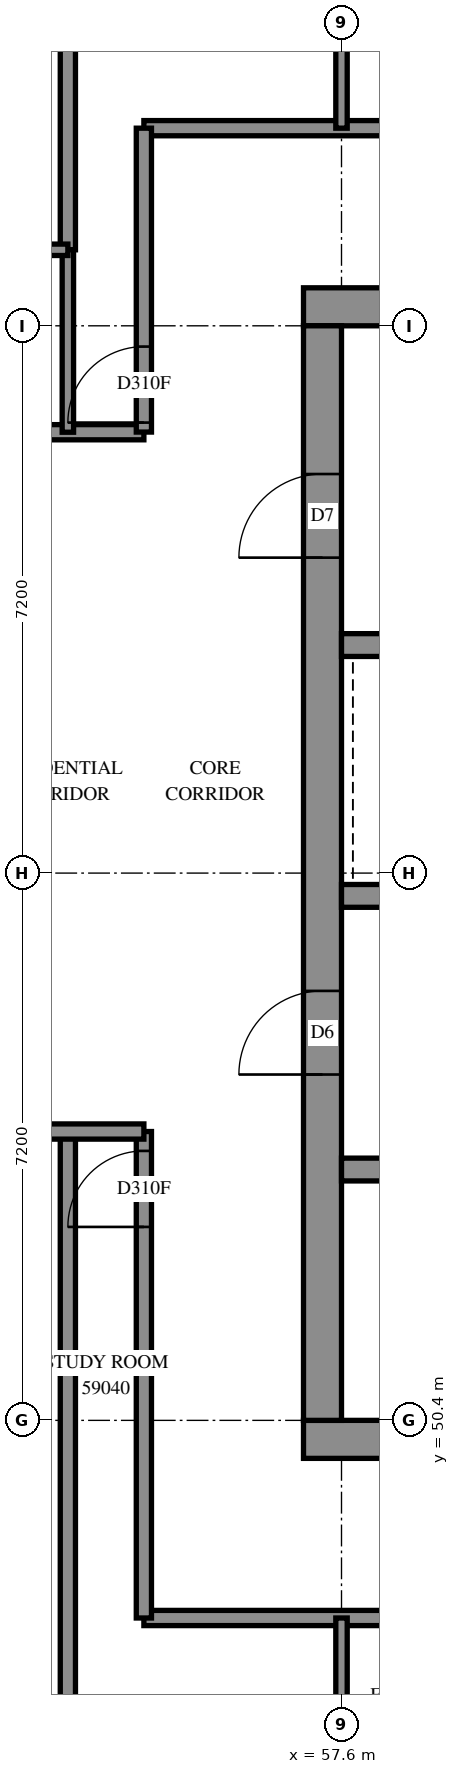
"""IFC4 building model, lengths in metres.
Left out: names, types, materials, properties, quantities, classifications, styles, units other than length and angle.
Written with IfcOpenShell. Run it as: python <this file> out.ifc"""

import sys

from ifc_helpers import new_model, si_unit, direction, frame, frame_2d, origin, place, context, subcontext, project, spatial, rectangle, extrude, element, fill, save


model = new_model("IFC4")
c1 = context("Model", 3, precision=1e-05, world=origin(), true_north=direction((0.0, 1.0)))
c2 = subcontext(c1, "Body", "Model", "MODEL_VIEW")
j1 = project(units=[si_unit("LENGTHUNIT", "METRE"), si_unit("PLANEANGLEUNIT", "RADIAN")], contexts=[c1])
p1 = place(None, origin())
s1 = spatial("IfcSite", under=j1, at=p1, CompositionType="ELEMENT")
p2 = place(p1, origin())
s2 = spatial("IfcBuilding", under=s1, at=p2, CompositionType="ELEMENT")
p3 = place(p2, frame((0.0, 0.0, 216.8)))
s3 = spatial("IfcBuildingStorey", under=s2, at=p3, CompositionType="ELEMENT", Elevation=216.8)
p4 = place(p3, frame((57.1, 50.15, -0.3), z_axis=(0.0, 0.0, 1.0), x_axis=(1.0, 0.0, 0.0)))
e1 = element("IfcWall", 1, at=p4, inside=s3, PredefinedType="SHEAR", context=c2, shape_type="SweptSolid", body=[
    extrude(rectangle(XDim=15.4, YDim=0.5, at=frame_2d((7.7, 0.0))), origin(), (0.0, 0.0, 1.0), 2.7),
])
p5 = place(p3, frame((57.1, 65.05, -0.3), z_axis=(0.0, 0.0, 1.0), x_axis=(1.0, 0.0, 0.0)))
e2 = element("IfcWall", 2, at=p5, inside=s3, PredefinedType="SHEAR", context=c2, shape_type="SweptSolid", body=[
    extrude(rectangle(XDim=15.4, YDim=0.5, at=frame_2d((7.7, 0.0))), origin(), (0.0, 0.0, 1.0), 2.7),
])
p6 = place(p5, frame((10.5, 0.0, 0.3)))
e3 = element("IfcOpeningElement", 3, at=p6, cuts=e2, PredefinedType="OPENING", context=c2, shape_type="SweptSolid", body=[
    extrude(rectangle(XDim=0.8, YDim=2.1, at=frame_2d((0.4, 1.05))), frame((0.0, 0.26, 0.0), z_axis=(0.0, -1.0, 0.0), x_axis=(1.0, 0.0, 0.0)), (0.0, 0.0, 1.0), 0.52),
])
p7 = place(p3, frame((57.35, 50.4, -0.3), z_axis=(0.0, 0.0, 1.0), x_axis=(0.0, 1.0, 0.0)))
e4 = element("IfcWall", 4, at=p7, inside=s3, PredefinedType="SHEAR", context=c2, shape_type="SweptSolid", body=[
    extrude(rectangle(XDim=14.4, YDim=0.5, at=frame_2d((7.2, 0.0))), origin(), (0.0, 0.0, 1.0), 2.7),
])
p8 = place(p7, frame((4.55, 0.0, 0.3)))
e5 = element("IfcOpeningElement", 5, at=p8, cuts=e4, PredefinedType="OPENING", context=c2, shape_type="SweptSolid", body=[
    extrude(rectangle(XDim=1.1, YDim=2.1, at=frame_2d((0.55, 1.05))), frame((0.0, 0.26, 0.0), z_axis=(0.0, -1.0, 0.0), x_axis=(1.0, 0.0, 0.0)), (0.0, 0.0, 1.0), 0.52),
])
p9 = place(p7, frame((11.35, 0.0, 0.3)))
e6 = element("IfcOpeningElement", 6, at=p9, cuts=e4, PredefinedType="OPENING", context=c2, shape_type="SweptSolid", body=[
    extrude(rectangle(XDim=1.1, YDim=2.1, at=frame_2d((0.55, 1.05))), frame((0.0, 0.26, 0.0), z_axis=(0.0, -1.0, 0.0), x_axis=(1.0, 0.0, 0.0)), (0.0, 0.0, 1.0), 0.52),
])
p10 = place(p3, frame((57.6, 53.7, 0.0), z_axis=(0.0, 0.0, 1.0), x_axis=(1.0, 0.0, 0.0)))
e7 = element("IfcWall", 7, at=p10, inside=s3, PredefinedType="SOLIDWALL", context=c2, shape_type="SweptSolid", body=[
    extrude(rectangle(XDim=14.4, YDim=0.3, at=frame_2d((7.2, 0.0))), origin(), (0.0, 0.0, 1.0), 3.1),
])
p11 = place(p10, frame((1.35, 0.0, 0.0)))
e8 = element("IfcOpeningElement", 8, at=p11, cuts=e7, PredefinedType="OPENING", context=c2, shape_type="SweptSolid", body=[
    extrude(rectangle(XDim=0.9, YDim=2.1, at=frame_2d((0.45, 1.05))), frame((0.0, 0.16, 0.0), z_axis=(0.0, -1.0, 0.0), x_axis=(1.0, 0.0, 0.0)), (0.0, 0.0, 1.0), 0.32),
])
p12 = place(p10, frame((4.95, 0.0, 0.0)))
e9 = element("IfcOpeningElement", 9, at=p12, cuts=e7, PredefinedType="OPENING", context=c2, shape_type="SweptSolid", body=[
    extrude(rectangle(XDim=0.9, YDim=2.1, at=frame_2d((0.45, 1.05))), frame((0.0, 0.16, 0.0), z_axis=(0.0, -1.0, 0.0), x_axis=(1.0, 0.0, 0.0)), (0.0, 0.0, 1.0), 0.32),
])
p13 = place(p10, frame((8.55, 0.0, 0.0)))
e10 = element("IfcOpeningElement", 10, at=p13, cuts=e7, PredefinedType="OPENING", context=c2, shape_type="SweptSolid", body=[
    extrude(rectangle(XDim=0.9, YDim=2.1, at=frame_2d((0.45, 1.05))), frame((0.0, 0.16, 0.0), z_axis=(0.0, -1.0, 0.0), x_axis=(1.0, 0.0, 0.0)), (0.0, 0.0, 1.0), 0.32),
])
p14 = place(p10, frame((12.05, 0.0, 0.0)))
e11 = element("IfcOpeningElement", 11, at=p14, cuts=e7, PredefinedType="OPENING", context=c2, shape_type="SweptSolid", body=[
    extrude(rectangle(XDim=1.1, YDim=2.1, at=frame_2d((0.55, 1.05))), frame((0.0, 0.16, 0.0), z_axis=(0.0, -1.0, 0.0), x_axis=(1.0, 0.0, 0.0)), (0.0, 0.0, 1.0), 0.32),
])
p15 = place(p3, frame((57.6, 57.3, 0.0), z_axis=(0.0, 0.0, 1.0), x_axis=(1.0, 0.0, 0.0)))
e12 = element("IfcWall", 12, at=p15, inside=s3, PredefinedType="SOLIDWALL", context=c2, shape_type="SweptSolid", body=[
    extrude(rectangle(XDim=14.4, YDim=0.3, at=frame_2d((7.2, 0.0))), origin(), (0.0, 0.0, 1.0), 3.1),
])
p16 = place(p15, frame((1.25, 0.0, 0.0)))
e13 = element("IfcOpeningElement", 13, at=p16, cuts=e12, PredefinedType="OPENING", context=c2, shape_type="SweptSolid", body=[
    extrude(rectangle(XDim=1.1, YDim=2.1, at=frame_2d((0.55, 1.05))), frame((0.0, 0.16, 0.0), z_axis=(0.0, -1.0, 0.0), x_axis=(1.0, 0.0, 0.0)), (0.0, 0.0, 1.0), 0.32),
])
p17 = place(p15, frame((4.85, 0.0, 0.0)))
e14 = element("IfcOpeningElement", 14, at=p17, cuts=e12, PredefinedType="OPENING", context=c2, shape_type="SweptSolid", body=[
    extrude(rectangle(XDim=1.1, YDim=2.1, at=frame_2d((0.55, 1.05))), frame((0.0, 0.16, 0.0), z_axis=(0.0, -1.0, 0.0), x_axis=(1.0, 0.0, 0.0)), (0.0, 0.0, 1.0), 0.32),
])
p18 = place(p15, frame((8.45, 0.0, 0.0)))
e15 = element("IfcOpeningElement", 15, at=p18, cuts=e12, PredefinedType="OPENING", context=c2, shape_type="SweptSolid", body=[
    extrude(rectangle(XDim=1.1, YDim=2.1, at=frame_2d((0.55, 1.05))), frame((0.0, 0.16, 0.0), z_axis=(0.0, -1.0, 0.0), x_axis=(1.0, 0.0, 0.0)), (0.0, 0.0, 1.0), 0.32),
])
p19 = place(p15, frame((12.05, 0.0, 0.0)))
e16 = element("IfcOpeningElement", 16, at=p19, cuts=e12, PredefinedType="OPENING", context=c2, shape_type="SweptSolid", body=[
    extrude(rectangle(XDim=1.1, YDim=2.1, at=frame_2d((0.55, 1.05))), frame((0.0, 0.16, 0.0), z_axis=(0.0, -1.0, 0.0), x_axis=(1.0, 0.0, 0.0)), (0.0, 0.0, 1.0), 0.32),
])
p20 = place(p3, frame((57.6, 60.6, 0.0), z_axis=(0.0, 0.0, 1.0), x_axis=(1.0, 0.0, 0.0)))
e17 = element("IfcWall", 17, at=p20, inside=s3, PredefinedType="SOLIDWALL", context=c2, shape_type="SweptSolid", body=[
    extrude(rectangle(XDim=7.2, YDim=0.3, at=frame_2d((3.6, 0.0))), origin(), (0.0, 0.0, 1.0), 3.1),
])
p21 = place(p3, frame((55.0, 67.4, 0.0), z_axis=(0.0, 0.0, 1.0), x_axis=(1.0, 0.0, 0.0)))
e18 = element("IfcWall", 18, at=p21, inside=s3, PredefinedType="PARTITIONING", context=c2, shape_type="SweptSolid", body=[
    extrude(rectangle(XDim=19.6, YDim=0.2, at=frame_2d((9.8, 0.0))), origin(), (0.0, 0.0, 1.0), 3.1),
])
p22 = place(p21, frame((4.9, 0.0, 0.0)))
e19 = element("IfcOpeningElement", 19, at=p22, cuts=e18, PredefinedType="OPENING", context=c2, shape_type="SweptSolid", body=[
    extrude(rectangle(XDim=0.9, YDim=2.1, at=frame_2d((0.45, 1.05))), frame((0.0, 0.11, 0.0), z_axis=(0.0, -1.0, 0.0), x_axis=(1.0, 0.0, 0.0)), (0.0, 0.0, 1.0), 0.22),
])
p23 = place(p21, frame((8.539, 0.0, 0.0)))
e20 = element("IfcOpeningElement", 20, at=p23, cuts=e18, PredefinedType="OPENING", context=c2, shape_type="SweptSolid", body=[
    extrude(rectangle(XDim=0.9, YDim=2.1, at=frame_2d((0.45, 1.05))), frame((0.0, 0.11, 0.0), z_axis=(0.0, -1.0, 0.0), x_axis=(1.0, 0.0, 0.0)), (0.0, 0.0, 1.0), 0.22),
])
p24 = place(p21, frame((13.8, 0.0, 0.0)))
e21 = element("IfcOpeningElement", 21, at=p24, cuts=e18, PredefinedType="OPENING", context=c2, shape_type="SweptSolid", body=[
    extrude(rectangle(XDim=0.9, YDim=2.1, at=frame_2d((0.45, 1.05))), frame((0.0, 0.11, 0.0), z_axis=(0.0, -1.0, 0.0), x_axis=(1.0, 0.0, 0.0)), (0.0, 0.0, 1.0), 0.22),
])
p25 = place(p3, frame((55.0, 47.8, 0.0), z_axis=(0.0, 0.0, 1.0), x_axis=(1.0, 0.0, 0.0)))
e22 = element("IfcWall", 22, at=p25, inside=s3, PredefinedType="PARTITIONING", context=c2, shape_type="SweptSolid", body=[
    extrude(rectangle(XDim=19.266, YDim=0.2, at=frame_2d((9.633, 0.0))), origin(), (0.0, 0.0, 1.0), 3.1),
])
p26 = place(p25, frame((4.9, 0.0, 0.0)))
e23 = element("IfcOpeningElement", 23, at=p26, cuts=e22, PredefinedType="OPENING", context=c2, shape_type="SweptSolid", body=[
    extrude(rectangle(XDim=0.9, YDim=2.1, at=frame_2d((0.45, 1.05))), frame((0.0, 0.11, 0.0), z_axis=(0.0, -1.0, 0.0), x_axis=(1.0, 0.0, 0.0)), (0.0, 0.0, 1.0), 0.22),
])
p27 = place(p25, frame((8.457, 0.0, 0.0)))
e24 = element("IfcOpeningElement", 24, at=p27, cuts=e22, PredefinedType="OPENING", context=c2, shape_type="SweptSolid", body=[
    extrude(rectangle(XDim=0.9, YDim=2.1, at=frame_2d((0.45, 1.05))), frame((0.0, 0.11, 0.0), z_axis=(0.0, -1.0, 0.0), x_axis=(1.0, 0.0, 0.0)), (0.0, 0.0, 1.0), 0.22),
])
p28 = place(p25, frame((13.8, 0.0, 0.0)))
e25 = element("IfcOpeningElement", 25, at=p28, cuts=e22, PredefinedType="OPENING", context=c2, shape_type="SweptSolid", body=[
    extrude(rectangle(XDim=0.9, YDim=2.1, at=frame_2d((0.45, 1.05))), frame((0.0, 0.11, 0.0), z_axis=(0.0, -1.0, 0.0), x_axis=(1.0, 0.0, 0.0)), (0.0, 0.0, 1.0), 0.22),
])
p29 = place(p3, frame((40.602, 63.4, 0.0), z_axis=(0.0, 0.0, 1.0), x_axis=(1.0, 0.0, 0.0)))
e26 = element("IfcWall", 26, at=p29, inside=s3, PredefinedType="PARTITIONING", context=c2, shape_type="SweptSolid", body=[
    extrude(rectangle(XDim=14.398, YDim=0.2, at=frame_2d((7.199, 0.0))), origin(), (0.0, 0.0, 1.0), 3.1),
])
p30 = place(p29, frame((0.124, 0.0, 0.0)))
e27 = element("IfcOpeningElement", 27, at=p30, cuts=e26, PredefinedType="OPENING", context=c2, shape_type="SweptSolid", body=[
    extrude(rectangle(XDim=1.0, YDim=2.1, at=frame_2d((0.5, 1.05))), frame((0.0, 0.11, 0.0), z_axis=(0.0, -1.0, 0.0), x_axis=(1.0, 0.0, 0.0)), (0.0, 0.0, 1.0), 0.22),
])
p31 = place(p29, frame((6.46, 0.0, 0.0)))
e28 = element("IfcOpeningElement", 28, at=p31, cuts=e26, PredefinedType="OPENING", context=c2, shape_type="SweptSolid", body=[
    extrude(rectangle(XDim=1.0, YDim=2.1, at=frame_2d((0.5, 1.05))), frame((0.0, 0.11, 0.0), z_axis=(0.0, -1.0, 0.0), x_axis=(1.0, 0.0, 0.0)), (0.0, 0.0, 1.0), 0.22),
])
p32 = place(p29, frame((10.198, 0.0, 0.0)))
e29 = element("IfcOpeningElement", 29, at=p32, cuts=e26, PredefinedType="OPENING", context=c2, shape_type="SweptSolid", body=[
    extrude(rectangle(XDim=0.9, YDim=2.1, at=frame_2d((0.45, 1.05))), frame((0.0, 0.11, 0.0), z_axis=(0.0, -1.0, 0.0), x_axis=(1.0, 0.0, 0.0)), (0.0, 0.0, 1.0), 0.22),
])
p33 = place(p3, frame((54.0, 42.327, 0.0), z_axis=(0.0, 0.0, 1.0), x_axis=(0.0, 1.0, 0.0)))
e30 = element("IfcWall", 30, at=p33, inside=s3, PredefinedType="PARTITIONING", context=c2, shape_type="SweptSolid", body=[
    extrude(rectangle(XDim=11.873, YDim=0.2, at=frame_2d((5.936, 0.0))), origin(), (0.0, 0.0, 1.0), 3.1),
])
p34 = place(p3, frame((54.0, 65.8, 0.0), z_axis=(0.0, 0.0, 1.0), x_axis=(0.0, 1.0, 0.0)))
e31 = element("IfcWall", 31, at=p34, inside=s3, PredefinedType="PARTITIONING", context=c2, shape_type="SweptSolid", body=[
    extrude(rectangle(XDim=6.992, YDim=0.2, at=frame_2d((3.496, 0.0))), origin(), (0.0, 0.0, 1.0), 3.1),
])
p35 = place(p3, frame((55.0, 47.8, 0.0), z_axis=(0.0, 0.0, 1.0), x_axis=(0.0, 1.0, 0.0)))
e32 = element("IfcWall", 32, at=p35, inside=s3, PredefinedType="PARTITIONING", context=c2, shape_type="SweptSolid", body=[
    extrude(rectangle(XDim=6.4, YDim=0.2, at=frame_2d((3.2, 0.0))), origin(), (0.0, 0.0, 1.0), 3.1),
])
p36 = place(p35, frame((5.145, 0.0, 0.0)))
e33 = element("IfcOpeningElement", 33, at=p36, cuts=e32, PredefinedType="OPENING", context=c2, shape_type="SweptSolid", body=[
    extrude(rectangle(XDim=1.0, YDim=2.1, at=frame_2d((0.5, 1.05))), frame((0.0, 0.11, 0.0), z_axis=(0.0, -1.0, 0.0), x_axis=(1.0, 0.0, 0.0)), (0.0, 0.0, 1.0), 0.22),
])
p37 = place(p3, frame((50.4, 54.2, 0.0), z_axis=(0.0, 0.0, 1.0), x_axis=(1.0, 0.0, 0.0)))
e34 = element("IfcWall", 34, at=p37, inside=s3, PredefinedType="PARTITIONING", context=c2, shape_type="SweptSolid", body=[
    extrude(rectangle(XDim=4.6, YDim=0.2, at=frame_2d((2.3, 0.0))), origin(), (0.0, 0.0, 1.0), 3.1),
])
p38 = place(p37, frame((2.3, 0.0, 0.0)))
e35 = element("IfcOpeningElement", 35, at=p38, cuts=e34, PredefinedType="OPENING", context=c2, shape_type="SweptSolid", body=[
    extrude(rectangle(XDim=0.9, YDim=2.1, at=frame_2d((0.45, 1.05))), frame((0.0, 0.11, 0.0), z_axis=(0.0, -1.0, 0.0), x_axis=(1.0, 0.0, 0.0)), (0.0, 0.0, 1.0), 0.22),
])
p39 = place(p3, frame((55.0, 63.402, 0.0), z_axis=(0.0, 0.0, 1.0), x_axis=(0.0, 1.0, 0.0)))
e36 = element("IfcWall", 36, at=p39, inside=s3, PredefinedType="PARTITIONING", context=c2, shape_type="SweptSolid", body=[
    extrude(rectangle(XDim=3.998, YDim=0.2, at=frame_2d((1.999, 0.0))), origin(), (0.0, 0.0, 1.0), 3.1),
])
p40 = place(p39, frame((0.125, 0.0, 0.0)))
e37 = element("IfcOpeningElement", 37, at=p40, cuts=e36, PredefinedType="OPENING", context=c2, shape_type="SweptSolid", body=[
    extrude(rectangle(XDim=1.0, YDim=2.1, at=frame_2d((0.5, 1.05))), frame((0.0, 0.11, 0.0), z_axis=(0.0, -1.0, 0.0), x_axis=(1.0, 0.0, 0.0)), (0.0, 0.0, 1.0), 0.22),
])
for number, where, z_axis, x_axis in (
    (38, (54.0, 63.4, 0.0), (0.0, 0.0, 1.0), (0.0, 1.0, 0.0)),
    (39, (57.6, 45.4, 0.0), (0.0, 0.0, 1.0), (0.0, 1.0, 0.0)),
    (40, (57.6, 67.4, 0.0), (0.0, 0.0, 1.0), (0.0, 1.0, 0.0)),
):
    element("IfcWall", number, at=place(p3, frame(where, z_axis=z_axis, x_axis=x_axis)), inside=s3, PredefinedType="PARTITIONING", context=c2, shape_type="SweptSolid", body=[
        extrude(rectangle(XDim=2.4, YDim=0.15, at=frame_2d((1.2, 0.0))), origin(), (0.0, 0.0, 1.0), 3.1),
    ])
p41 = place(p3, frame((52.1, 65.8, 0.0), z_axis=(0.0, 0.0, 1.0), x_axis=(1.0, 0.0, 0.0)))
e41 = element("IfcWall", 41, at=p41, inside=s3, PredefinedType="PARTITIONING", context=c2, shape_type="SweptSolid", body=[
    extrude(rectangle(XDim=1.9, YDim=0.15, at=frame_2d((0.95, 0.0))), origin(), (0.0, 0.0, 1.0), 3.1),
])
p42 = place(p41, frame((0.493, 0.0, 0.0)))
e42 = element("IfcOpeningElement", 42, at=p42, cuts=e41, PredefinedType="OPENING", context=c2, shape_type="SweptSolid", body=[
    extrude(rectangle(XDim=0.8, YDim=2.1, at=frame_2d((0.4, 1.05))), frame((0.0, 0.085, 0.0), z_axis=(0.0, -1.0, 0.0), x_axis=(1.0, 0.0, 0.0)), (0.0, 0.0, 1.0), 0.17),
])
p43 = place(p8, origin())
e43 = element("IfcDoor", 43, at=p43, inside=s3, OperationType="DOUBLE_DOOR_SINGLE_SWING", PredefinedType="DOOR", context=c2, shape_type="SweptSolid", body=[
    extrude(rectangle(XDim=1.1, YDim=2.1, at=frame_2d((0.55, 1.05))), frame((0.0, 0.025, 0.0), z_axis=(0.0, -1.0, 0.0), x_axis=(1.0, 0.0, 0.0)), (0.0, 0.0, 1.0), 0.05),
])
fill(e5, e43)
p44 = place(p9, origin())
e44 = element("IfcDoor", 44, at=p44, inside=s3, OperationType="SINGLE_SWING_LEFT", PredefinedType="DOOR", context=c2, shape_type="SweptSolid", body=[
    extrude(rectangle(XDim=1.1, YDim=2.1, at=frame_2d((0.55, 1.05))), frame((0.0, 0.025, 0.0), z_axis=(0.0, -1.0, 0.0), x_axis=(1.0, 0.0, 0.0)), (0.0, 0.0, 1.0), 0.05),
])
fill(e6, e44)
p45 = place(p40, origin())
e45 = element("IfcDoor", 45, at=p45, inside=s3, OperationType="SINGLE_SWING_LEFT", PredefinedType="DOOR", context=c2, shape_type="SweptSolid", body=[
    extrude(rectangle(XDim=1.0, YDim=2.1, at=frame_2d((0.5, 1.05))), frame((0.0, 0.025, 0.0), z_axis=(0.0, -1.0, 0.0), x_axis=(1.0, 0.0, 0.0)), (0.0, 0.0, 1.0), 0.05),
])
fill(e37, e45)
p46 = place(p36, origin())
e46 = element("IfcDoor", 46, at=p46, inside=s3, OperationType="SINGLE_SWING_RIGHT", PredefinedType="DOOR", context=c2, shape_type="SweptSolid", body=[
    extrude(rectangle(XDim=1.0, YDim=2.1, at=frame_2d((0.5, 1.05))), frame((0.0, 0.025, 0.0), z_axis=(0.0, -1.0, 0.0), x_axis=(1.0, 0.0, 0.0)), (0.0, 0.0, 1.0), 0.05),
])
fill(e33, e46)
save(model, sys.argv[1])
